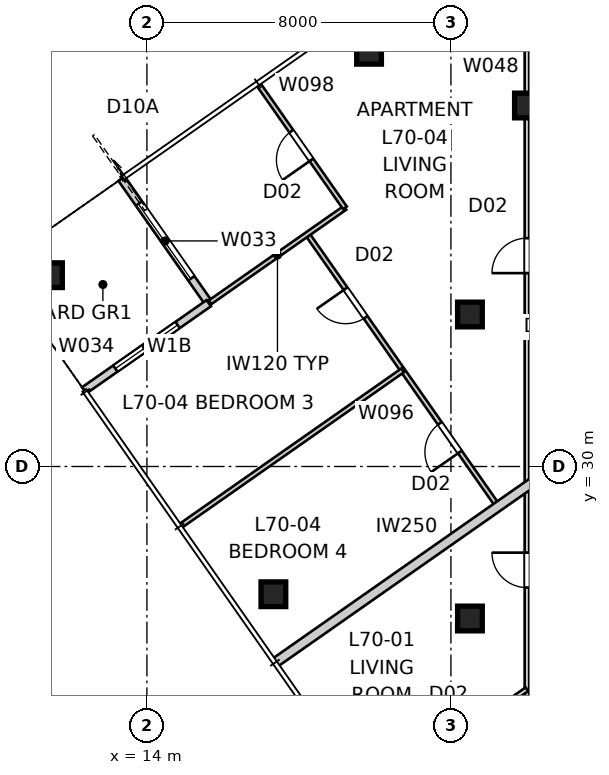
"""IFC4 building model, lengths in metres.
Left out: names, types, materials, properties, quantities, classifications, styles, units other than length and angle.
Written with IfcOpenShell. Run it as: python <this file> out.ifc"""

import sys

from ifc_helpers import new_model, si_unit, direction, frame, frame_2d, origin, origin_2d, place, context, subcontext, project, spatial, rectangle, extrude, element, fill, save


model = new_model("IFC4")
c1 = context("Model", 3, precision=1e-05, world=origin(), true_north=direction((0.0, 1.0)))
c2 = subcontext(c1, "Body", "Model", "MODEL_VIEW")
j1 = project(units=[si_unit("LENGTHUNIT", "METRE"), si_unit("PLANEANGLEUNIT", "RADIAN")], contexts=[c1])
p1 = place(None, origin())
s1 = spatial("IfcSite", under=j1, at=p1, CompositionType="ELEMENT")
p2 = place(p1, origin())
s2 = spatial("IfcBuilding", under=s1, at=p2, CompositionType="ELEMENT")
p3 = place(p2, frame((0.0, 0.0, 254.0)))
s3 = spatial("IfcBuildingStorey", under=s2, at=p3, CompositionType="ELEMENT", Elevation=254.0)
for number, where, z_axis, x_axis in (
    (1, (19.845, 40.914, 0.0), (0.0, 0.0, 1.0), (1.0, 0.0, 0.0)),
    (2, (11.449, 35.034, 0.0), (0.0, 0.0, 1.0), (1.0, 0.0, 0.0)),
    (3, (17.328, 26.638, 0.0), (0.0, 0.0, 1.0), (1.0, 0.0, 0.0)),
    (4, (24.0, 39.5, 0.0), (0.0, 0.0, 1.0), (1.0, 0.0, 0.0)),
    (5, (22.5, 34.0, 0.0), (0.0, 0.0, 1.0), (1.0, 0.0, 0.0)),
    (6, (22.5, 26.0, 0.0), (0.0, 0.0, 1.0), (1.0, 0.0, 0.0)),
):
    element("IfcColumn", number, at=place(p3, frame(where, z_axis=z_axis, x_axis=x_axis)), inside=s3, PredefinedType="COLUMN", context=c2, shape_type="SweptSolid", body=[
        extrude(rectangle(XDim=0.65, YDim=0.65, at=origin_2d()), origin(), (0.0, 0.0, 1.0), 3.4),
    ])
p4 = place(p3, frame((13.333, 37.574, 0.0), z_axis=(0.0, 0.0, 1.0), x_axis=(0.573556557423, -0.819165963305, 0.0)))
e7 = element("IfcWall", 7, at=p4, inside=s3, PredefinedType="SOLIDWALL", context=c2, shape_type="SweptSolid", body=[
    extrude(rectangle(XDim=4.0, YDim=0.2, at=frame_2d((2.0, 0.0))), origin(), (0.0, 0.0, 1.0), 3.25),
])
p5 = place(p4, frame((0.8, 0.0, 0.0)))
e8 = element("IfcOpeningElement", 8, at=p5, cuts=e7, PredefinedType="OPENING", context=c2, shape_type="SweptSolid", body=[
    extrude(rectangle(XDim=2.4, YDim=2.1, at=frame_2d((1.2, 1.05))), frame((0.0, 0.11, 0.0), z_axis=(0.0, -1.0, 0.0), x_axis=(1.0, 0.0, 0.0)), (0.0, 0.0, 1.0), 0.22),
])
p6 = place(p3, frame((15.627, 34.298, 0.0), z_axis=(0.0, 0.0, 1.0), x_axis=(-0.819137286189, -0.573597512525, 0.0)))
e9 = element("IfcWall", 9, at=p6, inside=s3, PredefinedType="SOLIDWALL", context=c2, shape_type="SweptSolid", body=[
    extrude(rectangle(XDim=4.0, YDim=0.2, at=frame_2d((2.0, 0.0))), origin(), (0.0, 0.0, 1.0), 3.25),
])
p7 = place(p6, frame((1.0, 0.0, 0.45)))
e10 = element("IfcOpeningElement", 10, at=p7, cuts=e9, PredefinedType="OPENING", context=c2, shape_type="SweptSolid", body=[
    extrude(rectangle(XDim=2.0, YDim=1.8, at=frame_2d((1.0, 0.9))), frame((0.0, 0.11, 0.0), z_axis=(0.0, -1.0, 0.0), x_axis=(1.0, 0.0, 0.0)), (0.0, 0.0, 1.0), 0.22),
])
p8 = place(p3, frame((17.369, 24.836, 0.0), z_axis=(0.0, 0.0, 1.0), x_axis=(0.81915902312, 0.573566469418, 0.0)))
e11 = element("IfcWall", 11, at=p8, inside=s3, PredefinedType="PARTITIONING", context=c2, shape_type="SweptSolid", body=[
    extrude(rectangle(XDim=9.756, YDim=0.25, at=frame_2d((4.878, 0.0))), origin(), (0.0, 0.0, 1.0), 3.25),
])
p9 = place(p3, frame((27.9, 25.068, 0.0), z_axis=(0.0, 0.0, 1.0), x_axis=(-1.0, 0.0, 0.0)))
e12 = element("IfcWall", 12, at=p9, inside=s3, PredefinedType="PARTITIONING", context=c2, shape_type="SweptSolid", body=[
    extrude(rectangle(XDim=3.9, YDim=0.12, at=frame_2d((1.95, 0.0))), origin(), (0.0, 0.0, 1.0), 3.25),
])
p10 = place(p9, frame((2.52, 0.0, 0.0)))
e13 = element("IfcOpeningElement", 13, at=p10, cuts=e12, PredefinedType="OPENING", context=c2, shape_type="SweptSolid", body=[
    extrude(rectangle(XDim=0.96, YDim=2.1, at=frame_2d((0.48, 1.05))), frame((0.0, 0.07, 0.0), z_axis=(0.0, -1.0, 0.0), x_axis=(1.0, 0.0, 0.0)), (0.0, 0.0, 1.0), 0.14),
])
p11 = place(p3, frame((24.0, 18.797, 0.0), z_axis=(0.0, 0.0, 1.0), x_axis=(0.0, 1.0, 0.0)))
e14 = element("IfcWall", 14, at=p11, inside=s3, PredefinedType="PARTITIONING", context=c2, shape_type="SweptSolid", body=[
    extrude(rectangle(XDim=26.198, YDim=0.12, at=frame_2d((13.099, 0.0))), origin(), (0.0, 0.0, 1.0), 2.549),
])
p12 = place(p11, frame((8.016, 0.0, 0.0)))
e15 = element("IfcOpeningElement", 15, at=p12, cuts=e14, PredefinedType="OPENING", context=c2, shape_type="SweptSolid", body=[
    extrude(rectangle(XDim=0.92, YDim=2.34, at=frame_2d((0.46, 1.17))), frame((0.0, 0.07, 0.0), z_axis=(0.0, -1.0, 0.0), x_axis=(1.0, 0.0, 0.0)), (0.0, 0.0, 1.0), 0.14),
])
p13 = place(p11, frame((16.292, 0.0, 0.0)))
e16 = element("IfcOpeningElement", 16, at=p13, cuts=e14, PredefinedType="OPENING", context=c2, shape_type="SweptSolid", body=[
    extrude(rectangle(XDim=0.92, YDim=2.34, at=frame_2d((0.46, 1.17))), frame((0.0, 0.07, 0.0), z_axis=(0.0, -1.0, 0.0), x_axis=(1.0, 0.0, 0.0)), (0.0, 0.0, 1.0), 0.14),
])
p14 = place(p3, frame((24.0, 24.138, 0.0), z_axis=(0.0, 0.0, 1.0), x_axis=(-0.819144584763, -0.57358708951, 0.0)))
e17 = element("IfcWall", 17, at=p14, inside=s3, PredefinedType="PARTITIONING", context=c2, shape_type="SweptSolid", body=[
    extrude(rectangle(XDim=4.991, YDim=0.12, at=frame_2d((2.496, 0.0))), origin(), (0.0, 0.0, 1.0), 3.25),
])
p15 = place(p14, frame((2.055, 0.0, 0.0)))
e18 = element("IfcOpeningElement", 18, at=p15, cuts=e17, PredefinedType="OPENING", context=c2, shape_type="SweptSolid", body=[
    extrude(rectangle(XDim=0.92, YDim=2.34, at=frame_2d((0.46, 1.17))), frame((0.0, 0.07, 0.0), z_axis=(0.0, -1.0, 0.0), x_axis=(1.0, 0.0, 0.0)), (0.0, 0.0, 1.0), 0.14),
])
p16 = place(p3, frame((23.24, 28.947, 0.0), z_axis=(0.0, 0.0, 1.0), x_axis=(-0.573582185905, 0.819148018378, 0.0)))
e19 = element("IfcWall", 19, at=p16, inside=s3, PredefinedType="PARTITIONING", context=c2, shape_type="SweptSolid", body=[
    extrude(rectangle(XDim=8.75, YDim=0.12, at=frame_2d((4.375, 0.0))), origin(), (0.0, 0.0, 1.0), 3.25),
])
p17 = place(p16, frame((6.078, 0.0, 0.0)))
e20 = element("IfcOpeningElement", 20, at=p17, cuts=e19, PredefinedType="OPENING", context=c2, shape_type="SweptSolid", body=[
    extrude(rectangle(XDim=0.92, YDim=2.34, at=frame_2d((0.46, 1.17))), frame((0.0, 0.07, 0.0), z_axis=(0.0, -1.0, 0.0), x_axis=(1.0, 0.0, 0.0)), (0.0, 0.0, 1.0), 0.14),
])
p18 = place(p16, frame((1.752, 0.0, 0.0)))
e21 = element("IfcOpeningElement", 21, at=p18, cuts=e19, PredefinedType="OPENING", context=c2, shape_type="SweptSolid", body=[
    extrude(rectangle(XDim=0.92, YDim=2.34, at=frame_2d((0.46, 1.17))), frame((0.0, 0.07, 0.0), z_axis=(0.0, -1.0, 0.0), x_axis=(1.0, 0.0, 0.0)), (0.0, 0.0, 1.0), 0.14),
])
p19 = place(p3, frame((15.66, 34.321, 0.0), z_axis=(0.0, 0.0, 1.0), x_axis=(0.819139307094, 0.573594626521, 0.0)))
e22 = element("IfcWall", 22, at=p19, inside=s3, PredefinedType="PARTITIONING", context=c2, shape_type="SweptSolid", body=[
    extrude(rectangle(XDim=4.335, YDim=0.12, at=frame_2d((2.167, 0.0))), origin(), (0.0, 0.0, 1.0), 3.25),
])
p20 = place(p3, frame((19.211, 36.807, 0.0), z_axis=(0.0, 0.0, 1.0), x_axis=(-0.573578200724, 0.819150808859, 0.0)))
e23 = element("IfcWall", 23, at=p20, inside=s3, PredefinedType="PARTITIONING", context=c2, shape_type="SweptSolid", body=[
    extrude(rectangle(XDim=3.96, YDim=0.12, at=frame_2d((1.98, 0.0))), origin(), (0.0, 0.0, 1.0), 3.25),
])
p21 = place(p20, frame((1.54, 0.0, 0.0)))
e24 = element("IfcOpeningElement", 24, at=p21, cuts=e23, PredefinedType="OPENING", context=c2, shape_type="SweptSolid", body=[
    extrude(rectangle(XDim=0.92, YDim=2.34, at=frame_2d((0.46, 1.17))), frame((0.0, 0.07, 0.0), z_axis=(0.0, -1.0, 0.0), x_axis=(1.0, 0.0, 0.0)), (0.0, 0.0, 1.0), 0.14),
])
p22 = place(p3, frame((20.731, 32.53, 0.0), z_axis=(0.0, 0.0, 1.0), x_axis=(-0.819153056029, -0.573574991434, 0.0)))
e25 = element("IfcWall", 25, at=p22, inside=s3, PredefinedType="PARTITIONING", context=c2, shape_type="SweptSolid", body=[
    extrude(rectangle(XDim=7.127, YDim=0.12, at=frame_2d((3.563, 0.0))), origin(), (0.0, 0.0, 1.0), 3.25),
])
p23 = place(p5, origin())
e26 = element("IfcDoor", 26, at=p23, inside=s3, OperationType="SLIDING_TO_LEFT", PredefinedType="DOOR", context=c2, shape_type="SweptSolid", body=[
    extrude(rectangle(XDim=2.4, YDim=2.1, at=frame_2d((1.2, 1.05))), frame((0.0, 0.025, 0.0), z_axis=(0.0, -1.0, 0.0), x_axis=(1.0, 0.0, 0.0)), (0.0, 0.0, 1.0), 0.05),
])
fill(e8, e26)
p24 = place(p7, origin())
e27 = element("IfcWindow", 27, at=p24, inside=s3, PartitioningType="SINGLE_PANEL", PredefinedType="WINDOW", context=c2, shape_type="SweptSolid", body=[
    extrude(rectangle(XDim=2.0, YDim=1.8, at=frame_2d((1.0, 0.9))), frame((0.0, 0.03, 0.0), z_axis=(0.0, -1.0, 0.0), x_axis=(1.0, 0.0, 0.0)), (0.0, 0.0, 1.0), 0.06),
])
fill(e10, e27)
p25 = place(p12, origin())
e28 = element("IfcDoor", 28, at=p25, inside=s3, OperationType="SINGLE_SWING_RIGHT", PredefinedType="DOOR", context=c2, shape_type="SweptSolid", body=[
    extrude(rectangle(XDim=0.92, YDim=2.34, at=frame_2d((0.46, 1.17))), frame((0.0, 0.025, 0.0), z_axis=(0.0, -1.0, 0.0), x_axis=(1.0, 0.0, 0.0)), (0.0, 0.0, 1.0), 0.05),
])
fill(e15, e28)
p26 = place(p13, origin())
e29 = element("IfcDoor", 29, at=p26, inside=s3, OperationType="SINGLE_SWING_LEFT", PredefinedType="DOOR", context=c2, shape_type="SweptSolid", body=[
    extrude(rectangle(XDim=0.92, YDim=2.34, at=frame_2d((0.46, 1.17))), frame((0.0, 0.025, 0.0), z_axis=(0.0, -1.0, 0.0), x_axis=(1.0, 0.0, 0.0)), (0.0, 0.0, 1.0), 0.05),
])
fill(e16, e29)
p27 = place(p17, origin())
e30 = element("IfcDoor", 30, at=p27, inside=s3, OperationType="SINGLE_SWING_RIGHT", PredefinedType="DOOR", context=c2, shape_type="SweptSolid", body=[
    extrude(rectangle(XDim=0.92, YDim=2.34, at=frame_2d((0.46, 1.17))), frame((0.0, 0.025, 0.0), z_axis=(0.0, -1.0, 0.0), x_axis=(1.0, 0.0, 0.0)), (0.0, 0.0, 1.0), 0.05),
])
fill(e20, e30)
p28 = place(p18, origin())
e31 = element("IfcDoor", 31, at=p28, inside=s3, OperationType="SINGLE_SWING_LEFT", PredefinedType="DOOR", context=c2, shape_type="SweptSolid", body=[
    extrude(rectangle(XDim=0.92, YDim=2.34, at=frame_2d((0.46, 1.17))), frame((0.0, 0.025, 0.0), z_axis=(0.0, -1.0, 0.0), x_axis=(1.0, 0.0, 0.0)), (0.0, 0.0, 1.0), 0.05),
])
fill(e21, e31)
p29 = place(p21, origin())
e32 = element("IfcDoor", 32, at=p29, inside=s3, OperationType="SINGLE_SWING_LEFT", PredefinedType="DOOR", context=c2, shape_type="SweptSolid", body=[
    extrude(rectangle(XDim=0.92, YDim=2.34, at=frame_2d((0.46, 1.17))), frame((0.0, 0.025, 0.0), z_axis=(0.0, -1.0, 0.0), x_axis=(1.0, 0.0, 0.0)), (0.0, 0.0, 1.0), 0.05),
])
fill(e24, e32)
save(model, sys.argv[1])
